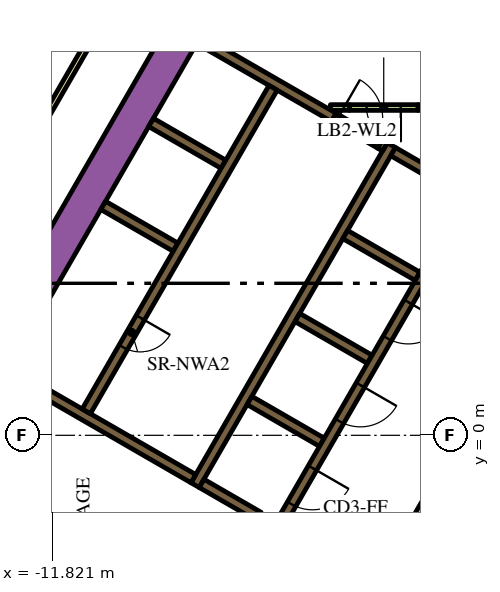
"""IFC4 building model, lengths in metres.
Left out: names, types, materials, properties, quantities, classifications, styles, units other than length and angle.
Written with IfcOpenShell. Run it as: python <this file> out.ifc"""

import sys

from ifc_helpers import new_model, si_unit, direction, frame, frame_2d, origin, place, context, subcontext, project, spatial, polyline, rectangle, outline, extrude, element, fill, save


model = new_model("IFC4")
c1 = context("Model", 3, precision=1e-05, world=origin(), true_north=direction((0.0, 1.0)))
c2 = subcontext(c1, "Body", "Model", "MODEL_VIEW")
j1 = project(units=[si_unit("LENGTHUNIT", "METRE"), si_unit("PLANEANGLEUNIT", "RADIAN")], contexts=[c1])
p1 = place(None, origin())
s1 = spatial("IfcSite", under=j1, at=p1, CompositionType="ELEMENT")
p2 = place(p1, origin())
s2 = spatial("IfcBuilding", under=s1, at=p2, CompositionType="ELEMENT")
p3 = place(p2, frame((0.0, 0.0, 66.6)))
s3 = spatial("IfcBuildingStorey", under=s2, at=p3, CompositionType="ELEMENT", Elevation=66.6)
p4 = place(p3, frame((-15.36, -1.503, 0.0), z_axis=(0.0, 0.0, 1.0), x_axis=(0.50000389221, 0.866023156604, 0.0)))
e1 = element("IfcWall", 1, at=p4, inside=s3, PredefinedType="SOLIDWALL", context=c2, shape_type="SweptSolid", body=[
    extrude(rectangle(XDim=21.0, YDim=0.9, at=frame_2d((10.5, 0.0))), origin(), (0.0, 0.0, 1.0), 3.9),
])
p5 = place(p3, frame((-8.06, -1.311, 0.0), z_axis=(0.0, 0.0, 1.0), x_axis=(0.50000273126, 0.866023826885, 0.0)))
e2 = element("IfcWall", 2, at=p5, inside=s3, PredefinedType="SOLIDWALL", context=c2, shape_type="SweptSolid", body=[
    extrude(rectangle(XDim=10.33, YDim=0.25, at=frame_2d((5.165, 0.0))), origin(), (0.0, 0.0, 1.0), 3.9),
])
p6 = place(p3, frame((-1.647, 6.771, 0.0), z_axis=(0.0, 0.0, 1.0), x_axis=(-0.865971728693, 0.500092956464, 0.0)))
e3 = element("IfcWall", 3, at=p6, inside=s3, PredefinedType="SOLIDWALL", context=c2, shape_type="SweptSolid", body=[
    extrude(rectangle(XDim=1.388, YDim=0.25, at=frame_2d((0.694, 0.0))), origin(), (0.0, 0.0, 1.0), 3.9),
])
for number, where, z_axis, x_axis in (
    (4, (-2.204, 4.182, 0.0), (0.0, 0.0, 1.0), (-0.866, 0.5, 0.0)),
    (5, (-5.369, 3.1, 0.0), (0.0, 0.0, 1.0), (0.866, -0.5, 0.0)),
    (6, (-4.724, -0.182, 0.0), (0.0, 0.0, 1.0), (-0.866, 0.5, 0.0)),
):
    element("IfcWall", number, at=place(p3, frame(where, z_axis=z_axis, x_axis=x_axis)), inside=s3, PredefinedType="SOLIDWALL", context=c2, shape_type="SweptSolid", body=[
        extrude(rectangle(XDim=2.2, YDim=0.25, at=frame_2d((1.1, 0.0))), origin(), (0.0, 0.0, 1.0), 3.9),
    ])
p7 = place(p3, frame((-7.889, -1.265, 0.0), z_axis=(0.0, 0.0, 1.0), x_axis=(0.865986741702, -0.500066958712, 0.0)))
e7 = element("IfcWall", 7, at=p7, inside=s3, PredefinedType="SOLIDWALL", context=c2, shape_type="SweptSolid", body=[
    extrude(rectangle(XDim=1.738, YDim=0.25, at=frame_2d((0.869, 0.0))), origin(), (0.0, 0.0, 1.0), 3.9),
])
p8 = place(p3, frame((-8.106, -1.14, 0.0), z_axis=(0.0, 0.0, 1.0), x_axis=(-0.866000643155, 0.500042884217, 0.0)))
e8 = element("IfcWall", 8, at=p8, inside=s3, PredefinedType="SOLIDWALL", context=c2, shape_type="SweptSolid", body=[
    extrude(rectangle(XDim=5.65, YDim=0.25, at=frame_2d((2.825, 0.0))), origin(), (0.0, 0.0, 1.0), 3.9),
])
p9 = place(p3, origin())
e9 = element("IfcWall", 9, at=p9, inside=s3, PredefinedType="SOLIDWALL", context=c2, shape_type="SweptSolid", body=[
    extrude(outline(polyline([(-3.128, 7.481), (-3.259, 7.557), (-3.134, 7.773), (-3.003, 7.698), (-3.128, 7.481)])), origin(), (0.0, 0.0, 1.0), 3.9),
])
for number, where, z_axis, x_axis in (
    (10, (-8.574, 4.95, 0.0), (0.0, 0.0, 1.0), (-0.866, 0.5, 0.0)),
    (11, (-7.314, 7.132, 0.0), (0.0, 0.0, 1.0), (-0.866, 0.5, 0.0)),
):
    element("IfcWall", number, at=place(p3, frame(where, z_axis=z_axis, x_axis=x_axis)), inside=s3, PredefinedType="SOLIDWALL", context=c2, shape_type="SweptSolid", body=[
        extrude(rectangle(XDim=2.2, YDim=0.25, at=frame_2d((1.1, 0.0))), origin(), (0.0, 0.0, 1.0), 3.9),
    ])
p10 = place(p3, frame((-7.959, 10.415, 0.0), z_axis=(0.0, 0.0, 1.0), x_axis=(0.866020958405, -0.500007699544, 0.0)))
e12 = element("IfcWall", 12, at=p10, inside=s3, PredefinedType="SOLIDWALL", context=c2, shape_type="SweptSolid", body=[
    extrude(rectangle(XDim=4.1, YDim=0.25, at=frame_2d((2.05, 0.0))), origin(), (0.0, 0.0, 1.0), 3.9),
])
p11 = place(p3, frame((-3.147, -3.718, 0.0), z_axis=(0.0, 0.0, 1.0), x_axis=(0.500010131483, 0.866019554291, 0.0)))
e13 = element("IfcWall", 13, at=p11, inside=s3, PredefinedType="PARTITIONING", context=c2, shape_type="SweptSolid", body=[
    extrude(rectangle(XDim=3.894, YDim=0.15, at=frame_2d((1.947, 0.0))), origin(), (0.0, 0.0, 1.0), 2.75),
])
p12 = place(p3, frame((-3.997, 8.625, 0.0), z_axis=(0.0, 0.0, 1.0), x_axis=(-1.0, 0.0, 0.0)))
e14 = element("IfcWall", 14, at=p12, inside=s3, PredefinedType="PARTITIONING", context=c2, shape_type="SweptSolid", body=[
    extrude(rectangle(XDim=0.502, YDim=0.15, at=frame_2d((0.251, 0.0))), origin(), (0.0, 0.0, 1.0), 2.75),
])
p13 = place(p3, frame((-2.196, 8.625, 0.0), z_axis=(0.0, 0.0, 1.0), x_axis=(1.0, 0.0, 0.0)))
e15 = element("IfcWall", 15, at=p13, inside=s3, PredefinedType="PARTITIONING", context=c2, shape_type="SweptSolid", body=[
    extrude(rectangle(XDim=1.146, YDim=0.15, at=frame_2d((0.573, 0.0))), origin(), (0.0, 0.0, 1.0), 2.75),
])
p14 = place(p3, frame((-6.008, 9.144, 0.0), z_axis=(0.0, 0.0, 1.0), x_axis=(-0.500006956611, -0.866021387346, 0.0)))
e16 = element("IfcWall", 16, at=p14, inside=s3, PredefinedType="SOLIDWALL", context=c2, shape_type="SweptSolid", body=[
    extrude(rectangle(XDim=9.83, YDim=0.25, at=frame_2d((4.915, 0.0))), origin(), (0.0, 0.0, 1.0), 3.9),
])
p15 = place(p14, frame((6.985, 0.0, 0.0)))
e17 = element("IfcOpeningElement", 17, at=p15, cuts=e16, PredefinedType="OPENING", context=c2, shape_type="SweptSolid", body=[
    extrude(rectangle(XDim=0.9, YDim=2.1, at=frame_2d((0.45, 1.05))), frame((0.0, 0.135, 0.0), z_axis=(0.0, -1.0, 0.0), x_axis=(1.0, 0.0, 0.0)), (0.0, 0.0, 1.0), 0.27),
])
p16 = place(p3, frame((-0.898, 6.194, 0.0), z_axis=(0.0, 0.0, 1.0), x_axis=(-0.499996202215, -0.866027596426, 0.0)))
e18 = element("IfcWall", 18, at=p16, inside=s3, PredefinedType="SOLIDWALL", context=c2, shape_type="SweptSolid", body=[
    extrude(rectangle(XDim=9.83, YDim=0.25, at=frame_2d((4.915, 0.0))), origin(), (0.0, 0.0, 1.0), 3.9),
])
p17 = place(p16, frame((0.585, 0.0, 0.0)))
e19 = element("IfcOpeningElement", 19, at=p17, cuts=e18, PredefinedType="OPENING", context=c2, shape_type="SweptSolid", body=[
    extrude(rectangle(XDim=1.1, YDim=2.1, at=frame_2d((0.55, 1.05))), frame((0.0, 0.135, 0.0), z_axis=(0.0, -1.0, 0.0), x_axis=(1.0, 0.0, 0.0)), (0.0, 0.0, 1.0), 0.27),
])
p18 = place(p16, frame((3.105, 0.0, 0.0)))
e20 = element("IfcOpeningElement", 20, at=p18, cuts=e18, PredefinedType="OPENING", context=c2, shape_type="SweptSolid", body=[
    extrude(rectangle(XDim=1.1, YDim=2.1, at=frame_2d((0.55, 1.05))), frame((0.0, 0.135, 0.0), z_axis=(0.0, -1.0, 0.0), x_axis=(1.0, 0.0, 0.0)), (0.0, 0.0, 1.0), 0.27),
])
p19 = place(p16, frame((5.625, 0.0, 0.0)))
e21 = element("IfcOpeningElement", 21, at=p19, cuts=e18, PredefinedType="OPENING", context=c2, shape_type="SweptSolid", body=[
    extrude(rectangle(XDim=1.1, YDim=2.1, at=frame_2d((0.55, 1.05))), frame((0.0, 0.135, 0.0), z_axis=(0.0, -1.0, 0.0), x_axis=(1.0, 0.0, 0.0)), (0.0, 0.0, 1.0), 0.27),
])
p20 = place(p16, frame((8.145, 0.0, 0.0)))
e22 = element("IfcOpeningElement", 22, at=p20, cuts=e18, PredefinedType="OPENING", context=c2, shape_type="SweptSolid", body=[
    extrude(rectangle(XDim=1.1, YDim=2.1, at=frame_2d((0.55, 1.05))), frame((0.0, 0.135, 0.0), z_axis=(0.0, -1.0, 0.0), x_axis=(1.0, 0.0, 0.0)), (0.0, 0.0, 1.0), 0.27),
])
p21 = place(p3, frame((-2.196, 8.625, 0.0), z_axis=(0.0, 0.0, 1.0), x_axis=(-1.0, 0.0, 0.0)))
e23 = element("IfcWall", 23, at=p21, inside=s3, PredefinedType="PARTITIONING", context=c2, shape_type="SweptSolid", body=[
    extrude(rectangle(XDim=1.8, YDim=0.15, at=frame_2d((0.9, 0.0))), origin(), (0.0, 0.0, 1.0), 2.75),
])
p22 = place(p21, frame((0.45, 0.0, 0.0)))
e24 = element("IfcOpeningElement", 24, at=p22, cuts=e23, PredefinedType="OPENING", context=c2, shape_type="SweptSolid", body=[
    extrude(rectangle(XDim=0.9, YDim=2.1, at=frame_2d((0.45, 1.05))), frame((0.0, 0.085, 0.0), z_axis=(0.0, -1.0, 0.0), x_axis=(1.0, 0.0, 0.0)), (0.0, 0.0, 1.0), 0.17),
])
p23 = place(p3, frame((-4.409, 8.365, 0.0), z_axis=(0.0, 0.0, 1.0), x_axis=(0.866034573852, -0.49998411664, 0.0)))
e25 = element("IfcWall", 25, at=p23, inside=s3, PredefinedType="SOLIDWALL", context=c2, shape_type="SweptSolid", body=[
    extrude(rectangle(XDim=1.4, YDim=0.25, at=frame_2d((0.7, 0.0))), origin(), (0.0, 0.0, 1.0), 3.9),
])
p24 = place(p23, frame((0.1, 0.0, 0.0)))
e26 = element("IfcOpeningElement", 26, at=p24, cuts=e25, PredefinedType="OPENING", context=c2, shape_type="SweptSolid", body=[
    extrude(rectangle(XDim=1.2, YDim=2.1, at=frame_2d((0.6, 1.05))), frame((0.0, 0.135, 0.0), z_axis=(0.0, -1.0, 0.0), x_axis=(1.0, 0.0, 0.0)), (0.0, 0.0, 1.0), 0.27),
])
p25 = place(p3, frame((-19.081, -3.9, 0.0), z_axis=(0.0, 0.0, 1.0), x_axis=(0.499998313975, 0.866026377209, 0.0)))
e27 = element("IfcWall", 27, at=p25, inside=s3, PredefinedType="PARTITIONING", context=c2, shape_type="SweptSolid", body=[
    extrude(rectangle(XDim=25.766, YDim=0.15, at=frame_2d((12.883, 0.0))), origin(), (0.0, 0.0, 1.0), 2.75),
])
p26 = place(p25, frame((24.586, 0.0, 0.0)))
e28 = element("IfcOpeningElement", 28, at=p26, cuts=e27, PredefinedType="OPENING", context=c2, shape_type="SweptSolid", body=[
    extrude(rectangle(XDim=1.0, YDim=2.1, at=frame_2d((0.5, 1.05))), frame((0.0, 0.085, 0.0), z_axis=(0.0, -1.0, 0.0), x_axis=(1.0, 0.0, 0.0)), (0.0, 0.0, 1.0), 0.17),
])
p27 = place(p25, frame((9.948, 0.0, 0.0)))
e29 = element("IfcOpeningElement", 29, at=p27, cuts=e27, PredefinedType="OPENING", context=c2, shape_type="SweptSolid", body=[
    extrude(rectangle(XDim=1.0, YDim=2.1, at=frame_2d((0.5, 1.05))), frame((0.0, 0.085, 0.0), z_axis=(0.0, -1.0, 0.0), x_axis=(1.0, 0.0, 0.0)), (0.0, 0.0, 1.0), 0.17),
])
p28 = place(p25, frame((7.782, 0.0, 0.0)))
e30 = element("IfcOpeningElement", 30, at=p28, cuts=e27, PredefinedType="OPENING", context=c2, shape_type="SweptSolid", body=[
    extrude(rectangle(XDim=0.9, YDim=2.1, at=frame_2d((0.45, 1.05))), frame((0.0, 0.085, 0.0), z_axis=(0.0, -1.0, 0.0), x_axis=(1.0, 0.0, 0.0)), (0.0, 0.0, 1.0), 0.17),
])
p29 = place(p25, frame((4.658, 0.0, 0.0)))
e31 = element("IfcOpeningElement", 31, at=p29, cuts=e27, PredefinedType="OPENING", context=c2, shape_type="SweptSolid", body=[
    extrude(rectangle(XDim=0.9, YDim=2.1, at=frame_2d((0.45, 1.05))), frame((0.0, 0.085, 0.0), z_axis=(0.0, -1.0, 0.0), x_axis=(1.0, 0.0, 0.0)), (0.0, 0.0, 1.0), 0.17),
])
p30 = place(p15, origin())
e32 = element("IfcDoor", 32, at=p30, inside=s3, OperationType="SINGLE_SWING_LEFT", PredefinedType="DOOR", context=c2, shape_type="SweptSolid", body=[
    extrude(rectangle(XDim=0.9, YDim=2.1, at=frame_2d((0.45, 1.05))), frame((0.0, 0.025, 0.0), z_axis=(0.0, -1.0, 0.0), x_axis=(1.0, 0.0, 0.0)), (0.0, 0.0, 1.0), 0.05),
])
fill(e17, e32)
p31 = place(p18, origin())
e33 = element("IfcDoor", 33, at=p31, inside=s3, OperationType="DOUBLE_DOOR_SLIDING", PredefinedType="DOOR", context=c2, shape_type="SweptSolid", body=[
    extrude(rectangle(XDim=1.1, YDim=2.1, at=frame_2d((0.55, 1.05))), frame((0.0, 0.025, 0.0), z_axis=(0.0, -1.0, 0.0), x_axis=(1.0, 0.0, 0.0)), (0.0, 0.0, 1.0), 0.05),
])
fill(e20, e33)
p32 = place(p19, origin())
e34 = element("IfcDoor", 34, at=p32, inside=s3, OperationType="DOUBLE_DOOR_SLIDING", PredefinedType="DOOR", context=c2, shape_type="SweptSolid", body=[
    extrude(rectangle(XDim=1.1, YDim=2.1, at=frame_2d((0.55, 1.05))), frame((0.0, 0.025, 0.0), z_axis=(0.0, -1.0, 0.0), x_axis=(1.0, 0.0, 0.0)), (0.0, 0.0, 1.0), 0.05),
])
fill(e21, e34)
p33 = place(p20, origin())
e35 = element("IfcDoor", 35, at=p33, inside=s3, OperationType="DOUBLE_DOOR_SLIDING", PredefinedType="DOOR", context=c2, shape_type="SweptSolid", body=[
    extrude(rectangle(XDim=1.1, YDim=2.1, at=frame_2d((0.55, 1.05))), frame((0.0, 0.025, 0.0), z_axis=(0.0, -1.0, 0.0), x_axis=(1.0, 0.0, 0.0)), (0.0, 0.0, 1.0), 0.05),
])
fill(e22, e35)
p34 = place(p22, origin())
e36 = element("IfcDoor", 36, at=p34, inside=s3, OperationType="SINGLE_SWING_LEFT", PredefinedType="DOOR", context=c2, shape_type="SweptSolid", body=[
    extrude(rectangle(XDim=0.9, YDim=2.1, at=frame_2d((0.45, 1.05))), frame((0.0, 0.025, 0.0), z_axis=(0.0, -1.0, 0.0), x_axis=(1.0, 0.0, 0.0)), (0.0, 0.0, 1.0), 0.05),
])
fill(e24, e36)
p35 = place(p24, origin())
e37 = element("IfcDoor", 37, at=p35, inside=s3, OperationType="SINGLE_SWING_LEFT", PredefinedType="DOOR", context=c2, shape_type="SweptSolid", body=[
    extrude(rectangle(XDim=1.2, YDim=2.1, at=frame_2d((0.6, 1.05))), frame((0.0, 0.025, 0.0), z_axis=(0.0, -1.0, 0.0), x_axis=(1.0, 0.0, 0.0)), (0.0, 0.0, 1.0), 0.05),
])
fill(e26, e37)
save(model, sys.argv[1])
